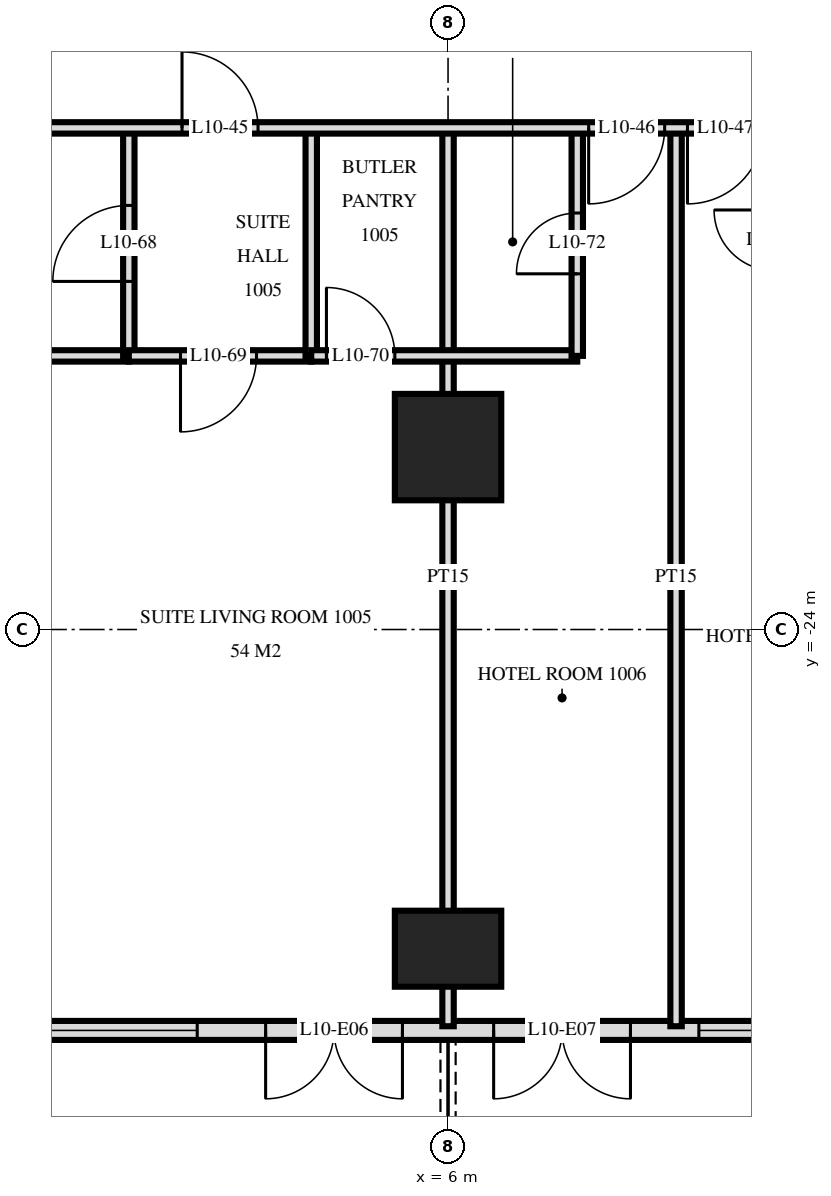
"""IFC4 building model, lengths in metres.
Left out: names, types, materials, properties, quantities, classifications, styles, units other than length and angle.
Written with IfcOpenShell. Run it as: python <this file> out.ifc"""

import sys

from ifc_helpers import new_model, si_unit, direction, frame, frame_2d, origin, origin_2d, place, context, subcontext, project, spatial, rectangle, extrude, element, fill, save


model = new_model("IFC4")
c1 = context("Model", 3, precision=1e-05, world=origin(), true_north=direction((0.0, 1.0)))
c2 = subcontext(c1, "Body", "Model", "MODEL_VIEW")
j1 = project(units=[si_unit("LENGTHUNIT", "METRE"), si_unit("PLANEANGLEUNIT", "RADIAN")], contexts=[c1])
p1 = place(None, origin())
s1 = spatial("IfcSite", under=j1, at=p1, CompositionType="ELEMENT")
p2 = place(p1, origin())
s2 = spatial("IfcBuilding", under=s1, at=p2, CompositionType="ELEMENT")
p3 = place(p2, frame((0.0, 0.0, 45.6)))
s3 = spatial("IfcBuildingStorey", under=s2, at=p3, CompositionType="ELEMENT", Elevation=45.6)
p4 = place(p3, frame((6.0, -28.2, 0.0), z_axis=(0.0, 0.0, 1.0), x_axis=(1.0, 0.0, 0.0)))
e1 = element("IfcColumn", 1, at=p4, inside=s3, PredefinedType="COLUMN", context=c2, shape_type="SweptSolid", body=[
    extrude(rectangle(XDim=1.4, YDim=1.0, at=origin_2d()), origin(), (0.0, 0.0, 1.0), 3.6),
])
p5 = place(p3, frame((6.0, -21.6, 0.0), z_axis=(0.0, 0.0, 1.0), x_axis=(1.0, 0.0, 0.0)))
e2 = element("IfcColumn", 2, at=p5, inside=s3, PredefinedType="COLUMN", context=c2, shape_type="SweptSolid", body=[
    extrude(rectangle(XDim=1.4, YDim=1.4, at=origin_2d()), origin(), (0.0, 0.0, 1.0), 3.6),
])
p6 = place(p3, frame((-28.775, -29.275, 0.0), z_axis=(0.0, 0.0, 1.0), x_axis=(1.0, 0.0, 0.0)))
e3 = element("IfcWall", 3, at=p6, inside=s3, PredefinedType="SOLIDWALL", context=c2, shape_type="SweptSolid", body=[
    extrude(rectangle(XDim=57.551, YDim=0.25, at=frame_2d((28.775, 0.0))), origin(), (0.0, 0.0, 1.0), 3.32),
])
p7 = place(p6, frame((0.575, 0.0, 0.0)))
e4 = element("IfcOpeningElement", 4, at=p7, cuts=e3, PredefinedType="OPENING", context=c2, shape_type="SweptSolid", body=[
    extrude(rectangle(XDim=1.8, YDim=2.4, at=frame_2d((0.9, 1.2))), frame((0.0, 0.135, 0.0), z_axis=(0.0, -1.0, 0.0), x_axis=(1.0, 0.0, 0.0)), (0.0, 0.0, 1.0), 0.27),
])
p8 = place(p6, frame((5.375, 0.0, 0.0)))
e5 = element("IfcOpeningElement", 5, at=p8, cuts=e3, PredefinedType="OPENING", context=c2, shape_type="SweptSolid", body=[
    extrude(rectangle(XDim=1.8, YDim=2.4, at=frame_2d((0.9, 1.2))), frame((0.0, 0.135, 0.0), z_axis=(0.0, -1.0, 0.0), x_axis=(1.0, 0.0, 0.0)), (0.0, 0.0, 1.0), 0.27),
])
p9 = place(p6, frame((8.075, 0.0, 0.3)))
e6 = element("IfcOpeningElement", 6, at=p9, cuts=e3, PredefinedType="OPENING", context=c2, shape_type="SweptSolid", body=[
    extrude(rectangle(XDim=2.4, YDim=2.1, at=frame_2d((1.2, 1.05))), frame((0.0, 0.135, 0.0), z_axis=(0.0, -1.0, 0.0), x_axis=(1.0, 0.0, 0.0)), (0.0, 0.0, 1.0), 0.27),
])
p10 = place(p6, frame((12.875, 0.0, 0.0)))
e7 = element("IfcOpeningElement", 7, at=p10, cuts=e3, PredefinedType="OPENING", context=c2, shape_type="SweptSolid", body=[
    extrude(rectangle(XDim=1.8, YDim=2.4, at=frame_2d((0.9, 1.2))), frame((0.0, 0.135, 0.0), z_axis=(0.0, -1.0, 0.0), x_axis=(1.0, 0.0, 0.0)), (0.0, 0.0, 1.0), 0.27),
])
p11 = place(p6, frame((17.375, 0.0, 0.0)))
e8 = element("IfcOpeningElement", 8, at=p11, cuts=e3, PredefinedType="OPENING", context=c2, shape_type="SweptSolid", body=[
    extrude(rectangle(XDim=1.8, YDim=2.4, at=frame_2d((0.9, 1.2))), frame((0.0, 0.135, 0.0), z_axis=(0.0, -1.0, 0.0), x_axis=(1.0, 0.0, 0.0)), (0.0, 0.0, 1.0), 0.27),
])
p12 = place(p6, frame((20.075, 0.0, 0.3)))
e9 = element("IfcOpeningElement", 9, at=p12, cuts=e3, PredefinedType="OPENING", context=c2, shape_type="SweptSolid", body=[
    extrude(rectangle(XDim=2.4, YDim=2.1, at=frame_2d((1.2, 1.05))), frame((0.0, 0.135, 0.0), z_axis=(0.0, -1.0, 0.0), x_axis=(1.0, 0.0, 0.0)), (0.0, 0.0, 1.0), 0.27),
])
p13 = place(p6, frame((23.075, 0.0, 0.3)))
e10 = element("IfcOpeningElement", 10, at=p13, cuts=e3, PredefinedType="OPENING", context=c2, shape_type="SweptSolid", body=[
    extrude(rectangle(XDim=2.4, YDim=2.1, at=frame_2d((1.2, 1.05))), frame((0.0, 0.135, 0.0), z_axis=(0.0, -1.0, 0.0), x_axis=(1.0, 0.0, 0.0)), (0.0, 0.0, 1.0), 0.27),
])
p14 = place(p6, frame((26.375, 0.0, 0.0)))
e11 = element("IfcOpeningElement", 11, at=p14, cuts=e3, PredefinedType="OPENING", context=c2, shape_type="SweptSolid", body=[
    extrude(rectangle(XDim=1.8, YDim=2.4, at=frame_2d((0.9, 1.2))), frame((0.0, 0.135, 0.0), z_axis=(0.0, -1.0, 0.0), x_axis=(1.0, 0.0, 0.0)), (0.0, 0.0, 1.0), 0.27),
])
p15 = place(p6, frame((29.075, 0.0, 0.3)))
e12 = element("IfcOpeningElement", 12, at=p15, cuts=e3, PredefinedType="OPENING", context=c2, shape_type="SweptSolid", body=[
    extrude(rectangle(XDim=2.4, YDim=2.1, at=frame_2d((1.2, 1.05))), frame((0.0, 0.135, 0.0), z_axis=(0.0, -1.0, 0.0), x_axis=(1.0, 0.0, 0.0)), (0.0, 0.0, 1.0), 0.27),
])
p16 = place(p6, frame((32.375, 0.0, 0.0)))
e13 = element("IfcOpeningElement", 13, at=p16, cuts=e3, PredefinedType="OPENING", context=c2, shape_type="SweptSolid", body=[
    extrude(rectangle(XDim=1.8, YDim=2.4, at=frame_2d((0.9, 1.2))), frame((0.0, 0.135, 0.0), z_axis=(0.0, -1.0, 0.0), x_axis=(1.0, 0.0, 0.0)), (0.0, 0.0, 1.0), 0.27),
])
p17 = place(p6, frame((35.375, 0.0, 0.0)))
e14 = element("IfcOpeningElement", 14, at=p17, cuts=e3, PredefinedType="OPENING", context=c2, shape_type="SweptSolid", body=[
    extrude(rectangle(XDim=1.8, YDim=2.4, at=frame_2d((0.9, 1.2))), frame((0.0, 0.135, 0.0), z_axis=(0.0, -1.0, 0.0), x_axis=(1.0, 0.0, 0.0)), (0.0, 0.0, 1.0), 0.27),
])
p18 = place(p6, frame((38.075, 0.0, 0.3)))
e15 = element("IfcOpeningElement", 15, at=p18, cuts=e3, PredefinedType="OPENING", context=c2, shape_type="SweptSolid", body=[
    extrude(rectangle(XDim=2.4, YDim=2.1, at=frame_2d((1.2, 1.05))), frame((0.0, 0.135, 0.0), z_axis=(0.0, -1.0, 0.0), x_axis=(1.0, 0.0, 0.0)), (0.0, 0.0, 1.0), 0.27),
])
p19 = place(p6, frame((41.075, 0.0, 0.3)))
e16 = element("IfcOpeningElement", 16, at=p19, cuts=e3, PredefinedType="OPENING", context=c2, shape_type="SweptSolid", body=[
    extrude(rectangle(XDim=2.4, YDim=2.1, at=frame_2d((1.2, 1.05))), frame((0.0, 0.135, 0.0), z_axis=(0.0, -1.0, 0.0), x_axis=(1.0, 0.0, 0.0)), (0.0, 0.0, 1.0), 0.27),
])
p20 = place(p6, frame((44.375, 0.0, 0.0)))
e17 = element("IfcOpeningElement", 17, at=p20, cuts=e3, PredefinedType="OPENING", context=c2, shape_type="SweptSolid", body=[
    extrude(rectangle(XDim=1.8, YDim=2.4, at=frame_2d((0.9, 1.2))), frame((0.0, 0.135, 0.0), z_axis=(0.0, -1.0, 0.0), x_axis=(1.0, 0.0, 0.0)), (0.0, 0.0, 1.0), 0.27),
])
p21 = place(p6, frame((47.075, 0.0, 0.3)))
e18 = element("IfcOpeningElement", 18, at=p21, cuts=e3, PredefinedType="OPENING", context=c2, shape_type="SweptSolid", body=[
    extrude(rectangle(XDim=2.4, YDim=2.1, at=frame_2d((1.2, 1.05))), frame((0.0, 0.135, 0.0), z_axis=(0.0, -1.0, 0.0), x_axis=(1.0, 0.0, 0.0)), (0.0, 0.0, 1.0), 0.27),
])
p22 = place(p6, frame((50.375, 0.0, 0.0)))
e19 = element("IfcOpeningElement", 19, at=p22, cuts=e3, PredefinedType="OPENING", context=c2, shape_type="SweptSolid", body=[
    extrude(rectangle(XDim=1.8, YDim=2.4, at=frame_2d((0.9, 1.2))), frame((0.0, 0.135, 0.0), z_axis=(0.0, -1.0, 0.0), x_axis=(1.0, 0.0, 0.0)), (0.0, 0.0, 1.0), 0.27),
])
p23 = place(p6, frame((53.375, 0.0, 0.0)))
e20 = element("IfcOpeningElement", 20, at=p23, cuts=e3, PredefinedType="OPENING", context=c2, shape_type="SweptSolid", body=[
    extrude(rectangle(XDim=1.8, YDim=2.4, at=frame_2d((0.9, 1.2))), frame((0.0, 0.135, 0.0), z_axis=(0.0, -1.0, 0.0), x_axis=(1.0, 0.0, 0.0)), (0.0, 0.0, 1.0), 0.27),
])
p24 = place(p3, frame((9.0, -29.22, 0.0), z_axis=(0.0, 0.0, 1.0), x_axis=(0.0, 1.0, 0.0)))
e21 = element("IfcWall", 21, at=p24, inside=s3, PredefinedType="PARTITIONING", context=c2, shape_type="SweptSolid", body=[
    extrude(rectangle(XDim=11.82, YDim=0.15, at=frame_2d((5.91, 0.0))), origin(), (0.0, 0.0, 1.0), 3.32),
])
p25 = place(p3, frame((7.7, -20.4, 0.0), z_axis=(0.0, 0.0, 1.0), x_axis=(0.0, 1.0, 0.0)))
e22 = element("IfcWall", 22, at=p25, inside=s3, PredefinedType="PARTITIONING", context=c2, shape_type="SweptSolid", body=[
    extrude(rectangle(XDim=3.0, YDim=0.15, at=frame_2d((1.5, 0.0))), origin(), (0.0, 0.0, 1.0), 3.32),
])
p26 = place(p25, frame((1.08, 0.0, 0.0)))
e23 = element("IfcOpeningElement", 23, at=p26, cuts=e22, PredefinedType="OPENING", context=c2, shape_type="SweptSolid", body=[
    extrude(rectangle(XDim=0.8, YDim=2.1, at=frame_2d((0.4, 1.05))), frame((0.0, 0.085, 0.0), z_axis=(0.0, -1.0, 0.0), x_axis=(1.0, 0.0, 0.0)), (0.0, 0.0, 1.0), 0.17),
])
p27 = place(p3, frame((6.0, -29.22, 0.0), z_axis=(0.0, 0.0, 1.0), x_axis=(0.0, 1.0, 0.0)))
e24 = element("IfcWall", 24, at=p27, inside=s3, PredefinedType="PARTITIONING", context=c2, shape_type="SweptSolid", body=[
    extrude(rectangle(XDim=11.82, YDim=0.15, at=frame_2d((5.91, 0.0))), origin(), (0.0, 0.0, 1.0), 3.32),
])
p28 = place(p3, frame((4.2, -20.4, 0.0), z_axis=(0.0, 0.0, 1.0), x_axis=(0.0, 1.0, 0.0)))
e25 = element("IfcWall", 25, at=p28, inside=s3, PredefinedType="PARTITIONING", context=c2, shape_type="SweptSolid", body=[
    extrude(rectangle(XDim=3.0, YDim=0.15, at=frame_2d((1.5, 0.0))), origin(), (0.0, 0.0, 1.0), 3.32),
])
p29 = place(p3, frame((1.8, -20.4, 0.0), z_axis=(0.0, 0.0, 1.0), x_axis=(0.0, 1.0, 0.0)))
e26 = element("IfcWall", 26, at=p29, inside=s3, PredefinedType="PARTITIONING", context=c2, shape_type="SweptSolid", body=[
    extrude(rectangle(XDim=3.0, YDim=0.15, at=frame_2d((1.5, 0.0))), origin(), (0.0, 0.0, 1.0), 3.32),
])
p30 = place(p29, frame((0.98, 0.0, 0.0)))
e27 = element("IfcOpeningElement", 27, at=p30, cuts=e26, PredefinedType="OPENING", context=c2, shape_type="SweptSolid", body=[
    extrude(rectangle(XDim=1.0, YDim=2.1, at=frame_2d((0.5, 1.05))), frame((0.0, 0.085, 0.0), z_axis=(0.0, -1.0, 0.0), x_axis=(1.0, 0.0, 0.0)), (0.0, 0.0, 1.0), 0.17),
])
p31 = place(p3, frame((1.8, -20.4, 0.0), z_axis=(0.0, 0.0, 1.0), x_axis=(1.0, 0.0, 0.0)))
e28 = element("IfcWall", 28, at=p31, inside=s3, PredefinedType="PARTITIONING", context=c2, shape_type="SweptSolid", body=[
    extrude(rectangle(XDim=2.4, YDim=0.15, at=frame_2d((1.2, 0.0))), origin(), (0.0, 0.0, 1.0), 3.32),
])
p32 = place(p31, frame((0.68, 0.0, 0.0)))
e29 = element("IfcOpeningElement", 29, at=p32, cuts=e28, PredefinedType="OPENING", context=c2, shape_type="SweptSolid", body=[
    extrude(rectangle(XDim=1.0, YDim=2.1, at=frame_2d((0.5, 1.05))), frame((0.0, 0.085, 0.0), z_axis=(0.0, -1.0, 0.0), x_axis=(1.0, 0.0, 0.0)), (0.0, 0.0, 1.0), 0.17),
])
p33 = place(p3, frame((-4.2, -20.4, 0.0), z_axis=(0.0, 0.0, 1.0), x_axis=(1.0, 0.0, 0.0)))
e30 = element("IfcWall", 30, at=p33, inside=s3, PredefinedType="PARTITIONING", context=c2, shape_type="SweptSolid", body=[
    extrude(rectangle(XDim=6.0, YDim=0.15, at=frame_2d((3.0, 0.0))), origin(), (0.0, 0.0, 1.0), 3.32),
])
p34 = place(p33, frame((1.03, 0.0, 0.0)))
e31 = element("IfcOpeningElement", 31, at=p34, cuts=e30, PredefinedType="OPENING", context=c2, shape_type="SweptSolid", body=[
    extrude(rectangle(XDim=0.9, YDim=2.1, at=frame_2d((0.45, 1.05))), frame((0.0, 0.085, 0.0), z_axis=(0.0, -1.0, 0.0), x_axis=(1.0, 0.0, 0.0)), (0.0, 0.0, 1.0), 0.17),
])
p35 = place(p3, frame((4.2, -20.4, 0.0), z_axis=(0.0, 0.0, 1.0), x_axis=(1.0, 0.0, 0.0)))
e32 = element("IfcWall", 32, at=p35, inside=s3, PredefinedType="PARTITIONING", context=c2, shape_type="SweptSolid", body=[
    extrude(rectangle(XDim=3.5, YDim=0.15, at=frame_2d((1.75, 0.0))), origin(), (0.0, 0.0, 1.0), 3.32),
])
p36 = place(p35, frame((0.2, 0.0, 0.0)))
e33 = element("IfcOpeningElement", 33, at=p36, cuts=e32, PredefinedType="OPENING", context=c2, shape_type="SweptSolid", body=[
    extrude(rectangle(XDim=0.9, YDim=2.1, at=frame_2d((0.45, 1.05))), frame((0.0, 0.085, 0.0), z_axis=(0.0, -1.0, 0.0), x_axis=(1.0, 0.0, 0.0)), (0.0, 0.0, 1.0), 0.17),
])
p37 = place(p3, frame((-33.12, -17.4, 0.0), z_axis=(0.0, 0.0, 1.0), x_axis=(1.0, 0.0, 0.0)))
e34 = element("IfcWall", 34, at=p37, inside=s3, PredefinedType="PARTITIONING", context=c2, shape_type="SweptSolid", body=[
    extrude(rectangle(XDim=66.24, YDim=0.15, at=frame_2d((33.12, 0.0))), origin(), (0.0, 0.0, 1.0), 3.32),
])
p38 = place(p37, frame((9.27, 0.0, 0.0)))
e35 = element("IfcOpeningElement", 35, at=p38, cuts=e34, PredefinedType="OPENING", context=c2, shape_type="SweptSolid", body=[
    extrude(rectangle(XDim=1.0, YDim=2.1, at=frame_2d((0.5, 1.05))), frame((0.0, 0.085, 0.0), z_axis=(0.0, -1.0, 0.0), x_axis=(1.0, 0.0, 0.0)), (0.0, 0.0, 1.0), 0.17),
])
p39 = place(p37, frame((13.97, 0.0, 0.0)))
e36 = element("IfcOpeningElement", 36, at=p39, cuts=e34, PredefinedType="OPENING", context=c2, shape_type="SweptSolid", body=[
    extrude(rectangle(XDim=1.0, YDim=2.1, at=frame_2d((0.5, 1.05))), frame((0.0, 0.085, 0.0), z_axis=(0.0, -1.0, 0.0), x_axis=(1.0, 0.0, 0.0)), (0.0, 0.0, 1.0), 0.17),
])
p40 = place(p37, frame((17.62, 0.0, 0.0)))
e37 = element("IfcOpeningElement", 37, at=p40, cuts=e34, PredefinedType="OPENING", context=c2, shape_type="SweptSolid", body=[
    extrude(rectangle(XDim=1.0, YDim=2.1, at=frame_2d((0.5, 1.05))), frame((0.0, 0.085, 0.0), z_axis=(0.0, -1.0, 0.0), x_axis=(1.0, 0.0, 0.0)), (0.0, 0.0, 1.0), 0.17),
])
p41 = place(p37, frame((21.27, 0.0, 0.0)))
e38 = element("IfcOpeningElement", 38, at=p41, cuts=e34, PredefinedType="OPENING", context=c2, shape_type="SweptSolid", body=[
    extrude(rectangle(XDim=1.0, YDim=2.1, at=frame_2d((0.5, 1.05))), frame((0.0, 0.085, 0.0), z_axis=(0.0, -1.0, 0.0), x_axis=(1.0, 0.0, 0.0)), (0.0, 0.0, 1.0), 0.17),
])
p42 = place(p37, frame((25.97, 0.0, 0.0)))
e39 = element("IfcOpeningElement", 39, at=p42, cuts=e34, PredefinedType="OPENING", context=c2, shape_type="SweptSolid", body=[
    extrude(rectangle(XDim=1.0, YDim=2.1, at=frame_2d((0.5, 1.05))), frame((0.0, 0.085, 0.0), z_axis=(0.0, -1.0, 0.0), x_axis=(1.0, 0.0, 0.0)), (0.0, 0.0, 1.0), 0.17),
])
p43 = place(p37, frame((35.62, 0.0, 0.0)))
e40 = element("IfcOpeningElement", 40, at=p43, cuts=e34, PredefinedType="OPENING", context=c2, shape_type="SweptSolid", body=[
    extrude(rectangle(XDim=1.0, YDim=2.1, at=frame_2d((0.5, 1.05))), frame((0.0, 0.085, 0.0), z_axis=(0.0, -1.0, 0.0), x_axis=(1.0, 0.0, 0.0)), (0.0, 0.0, 1.0), 0.17),
])
p44 = place(p37, frame((40.97, 0.0, 0.0)))
e41 = element("IfcOpeningElement", 41, at=p44, cuts=e34, PredefinedType="OPENING", context=c2, shape_type="SweptSolid", body=[
    extrude(rectangle(XDim=1.0, YDim=2.1, at=frame_2d((0.5, 1.05))), frame((0.0, 0.085, 0.0), z_axis=(0.0, -1.0, 0.0), x_axis=(1.0, 0.0, 0.0)), (0.0, 0.0, 1.0), 0.17),
])
p45 = place(p37, frame((42.27, 0.0, 0.0)))
e42 = element("IfcOpeningElement", 42, at=p45, cuts=e34, PredefinedType="OPENING", context=c2, shape_type="SweptSolid", body=[
    extrude(rectangle(XDim=1.0, YDim=2.1, at=frame_2d((0.5, 1.05))), frame((0.0, 0.085, 0.0), z_axis=(0.0, -1.0, 0.0), x_axis=(1.0, 0.0, 0.0)), (0.0, 0.0, 1.0), 0.17),
])
p46 = place(p37, frame((49.72, 0.0, 0.0)))
e43 = element("IfcOpeningElement", 43, at=p46, cuts=e34, PredefinedType="OPENING", context=c2, shape_type="SweptSolid", body=[
    extrude(rectangle(XDim=1.0, YDim=2.1, at=frame_2d((0.5, 1.05))), frame((0.0, 0.085, 0.0), z_axis=(0.0, -1.0, 0.0), x_axis=(1.0, 0.0, 0.0)), (0.0, 0.0, 1.0), 0.17),
])
p47 = place(p37, frame((51.27, 0.0, 0.0)))
e44 = element("IfcOpeningElement", 44, at=p47, cuts=e34, PredefinedType="OPENING", context=c2, shape_type="SweptSolid", body=[
    extrude(rectangle(XDim=1.0, YDim=2.1, at=frame_2d((0.5, 1.05))), frame((0.0, 0.085, 0.0), z_axis=(0.0, -1.0, 0.0), x_axis=(1.0, 0.0, 0.0)), (0.0, 0.0, 1.0), 0.17),
])
p48 = place(p37, frame((4.42, 0.0, 0.0)))
e45 = element("IfcOpeningElement", 45, at=p48, cuts=e34, PredefinedType="OPENING", context=c2, shape_type="SweptSolid", body=[
    extrude(rectangle(XDim=1.0, YDim=2.1, at=frame_2d((0.5, 1.05))), frame((0.0, 0.085, 0.0), z_axis=(0.0, -1.0, 0.0), x_axis=(1.0, 0.0, 0.0)), (0.0, 0.0, 1.0), 0.17),
])
p49 = place(p37, frame((54.82, 0.0, 0.0)))
e46 = element("IfcOpeningElement", 46, at=p49, cuts=e34, PredefinedType="OPENING", context=c2, shape_type="SweptSolid", body=[
    extrude(rectangle(XDim=1.0, YDim=2.1, at=frame_2d((0.5, 1.05))), frame((0.0, 0.085, 0.0), z_axis=(0.0, -1.0, 0.0), x_axis=(1.0, 0.0, 0.0)), (0.0, 0.0, 1.0), 0.17),
])
p50 = place(p15, origin())
e47 = element("IfcWindow", 47, at=p50, inside=s3, PartitioningType="SINGLE_PANEL", PredefinedType="WINDOW", context=c2, shape_type="SweptSolid", body=[
    extrude(rectangle(XDim=2.4, YDim=2.1, at=frame_2d((1.2, 1.05))), frame((0.0, 0.03, 0.0), z_axis=(0.0, -1.0, 0.0), x_axis=(1.0, 0.0, 0.0)), (0.0, 0.0, 1.0), 0.06),
])
fill(e12, e47)
p51 = place(p16, frame((0.9, 0.0, 0.0), z_axis=(0.0, 0.0, 1.0), x_axis=(-1.0, 0.0, 0.0)))
e48 = element("IfcDoor", 48, at=p51, inside=s3, OperationType="DOUBLE_DOOR_SINGLE_SWING", PredefinedType="DOOR", context=c2, shape_type="SweptSolid", body=[
    extrude(rectangle(XDim=1.8, YDim=2.4, at=frame_2d((0.0, 1.2))), frame((0.0, -0.025, 0.0), z_axis=(0.0, 1.0, 0.0), x_axis=(-1.0, 0.0, 0.0)), (0.0, 0.0, 1.0), 0.05),
])
fill(e13, e48)
p52 = place(p17, frame((0.9, 0.0, 0.0), z_axis=(0.0, 0.0, 1.0), x_axis=(-1.0, 0.0, 0.0)))
e49 = element("IfcDoor", 49, at=p52, inside=s3, OperationType="DOUBLE_DOOR_SINGLE_SWING", PredefinedType="DOOR", context=c2, shape_type="SweptSolid", body=[
    extrude(rectangle(XDim=1.8, YDim=2.4, at=frame_2d((0.0, 1.2))), frame((0.0, -0.025, 0.0), z_axis=(0.0, 1.0, 0.0), x_axis=(-1.0, 0.0, 0.0)), (0.0, 0.0, 1.0), 0.05),
])
fill(e14, e49)
p53 = place(p18, origin())
e50 = element("IfcWindow", 50, at=p53, inside=s3, PartitioningType="SINGLE_PANEL", PredefinedType="WINDOW", context=c2, shape_type="SweptSolid", body=[
    extrude(rectangle(XDim=2.4, YDim=2.1, at=frame_2d((1.2, 1.05))), frame((0.0, 0.03, 0.0), z_axis=(0.0, -1.0, 0.0), x_axis=(1.0, 0.0, 0.0)), (0.0, 0.0, 1.0), 0.06),
])
fill(e15, e50)
p54 = place(p43, origin())
e51 = element("IfcDoor", 51, at=p54, inside=s3, OperationType="SINGLE_SWING_RIGHT", PredefinedType="DOOR", context=c2, shape_type="SweptSolid", body=[
    extrude(rectangle(XDim=1.0, YDim=2.1, at=frame_2d((0.5, 1.05))), frame((0.0, 0.025, 0.0), z_axis=(0.0, -1.0, 0.0), x_axis=(1.0, 0.0, 0.0)), (0.0, 0.0, 1.0), 0.05),
])
fill(e40, e51)
p55 = place(p44, frame((0.5, 0.0, 0.0), z_axis=(0.0, 0.0, 1.0), x_axis=(-1.0, 0.0, 0.0)))
e52 = element("IfcDoor", 52, at=p55, inside=s3, OperationType="SINGLE_SWING_LEFT", PredefinedType="DOOR", context=c2, shape_type="SweptSolid", body=[
    extrude(rectangle(XDim=1.0, YDim=2.1, at=frame_2d((0.0, 1.05))), frame((0.0, -0.025, 0.0), z_axis=(0.0, 1.0, 0.0), x_axis=(-1.0, 0.0, 0.0)), (0.0, 0.0, 1.0), 0.05),
])
fill(e41, e52)
p56 = place(p45, frame((0.5, 0.0, 0.0), z_axis=(0.0, 0.0, 1.0), x_axis=(-1.0, 0.0, 0.0)))
e53 = element("IfcDoor", 53, at=p56, inside=s3, OperationType="SINGLE_SWING_LEFT", PredefinedType="DOOR", context=c2, shape_type="SweptSolid", body=[
    extrude(rectangle(XDim=1.0, YDim=2.1, at=frame_2d((0.0, 1.05))), frame((0.0, -0.025, 0.0), z_axis=(0.0, 1.0, 0.0), x_axis=(-1.0, 0.0, 0.0)), (0.0, 0.0, 1.0), 0.05),
])
fill(e42, e53)
p57 = place(p30, origin())
e54 = element("IfcDoor", 54, at=p57, inside=s3, OperationType="SINGLE_SWING_RIGHT", PredefinedType="DOOR", context=c2, shape_type="SweptSolid", body=[
    extrude(rectangle(XDim=1.0, YDim=2.1, at=frame_2d((0.5, 1.05))), frame((0.0, 0.025, 0.0), z_axis=(0.0, -1.0, 0.0), x_axis=(1.0, 0.0, 0.0)), (0.0, 0.0, 1.0), 0.05),
])
fill(e27, e54)
p58 = place(p32, frame((0.5, 0.0, 0.0), z_axis=(0.0, 0.0, 1.0), x_axis=(-1.0, 0.0, 0.0)))
e55 = element("IfcDoor", 55, at=p58, inside=s3, OperationType="SINGLE_SWING_LEFT", PredefinedType="DOOR", context=c2, shape_type="SweptSolid", body=[
    extrude(rectangle(XDim=1.0, YDim=2.1, at=frame_2d((0.0, 1.05))), frame((0.0, -0.025, 0.0), z_axis=(0.0, 1.0, 0.0), x_axis=(-1.0, 0.0, 0.0)), (0.0, 0.0, 1.0), 0.05),
])
fill(e29, e55)
p59 = place(p36, origin())
e56 = element("IfcDoor", 56, at=p59, inside=s3, OperationType="SINGLE_SWING_RIGHT", PredefinedType="DOOR", context=c2, shape_type="SweptSolid", body=[
    extrude(rectangle(XDim=0.9, YDim=2.1, at=frame_2d((0.45, 1.05))), frame((0.0, 0.025, 0.0), z_axis=(0.0, -1.0, 0.0), x_axis=(1.0, 0.0, 0.0)), (0.0, 0.0, 1.0), 0.05),
])
fill(e33, e56)
p60 = place(p26, origin())
e57 = element("IfcDoor", 57, at=p60, inside=s3, OperationType="SINGLE_SWING_RIGHT", PredefinedType="DOOR", context=c2, shape_type="SweptSolid", body=[
    extrude(rectangle(XDim=0.8, YDim=2.1, at=frame_2d((0.4, 1.05))), frame((0.0, 0.025, 0.0), z_axis=(0.0, -1.0, 0.0), x_axis=(1.0, 0.0, 0.0)), (0.0, 0.0, 1.0), 0.05),
])
fill(e23, e57)
save(model, sys.argv[1])
